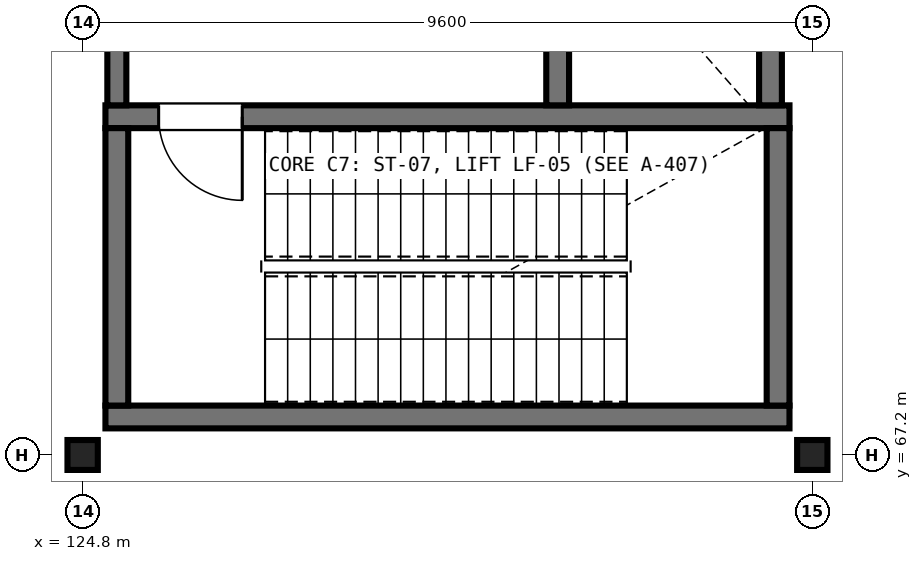
"""IFC4 building model, lengths in metres.
Left out: names, types, materials, properties, quantities, classifications, styles, units other than length and angle.
Written with IfcOpenShell. Run it as: python <this file> out.ifc"""

import sys

from ifc_helpers import new_model, si_unit, direction, frame, frame_2d, origin, origin_2d, place, context, subcontext, project, spatial, rectangle, i_section, extrude, element, fill, save


model = new_model("IFC4")
c1 = context("Model", 3, precision=1e-05, world=origin(), true_north=direction((0.0, 1.0)))
c2 = subcontext(c1, "Body", "Model", "MODEL_VIEW")
j1 = project(units=[si_unit("LENGTHUNIT", "METRE"), si_unit("PLANEANGLEUNIT", "RADIAN")], contexts=[c1])
p1 = place(None, origin())
s1 = spatial("IfcSite", under=j1, at=p1, CompositionType="ELEMENT")
p2 = place(p1, origin())
s2 = spatial("IfcBuilding", under=s1, at=p2, CompositionType="ELEMENT")
p3 = place(p2, origin())
s3 = spatial("IfcBuildingStorey", under=s2, at=p3, CompositionType="ELEMENT", Elevation=0.0)
for number, where, z_axis, x_axis in (
    (1, (124.8, 67.2, 0.0), (0.0, 0.0, 1.0), (1.0, 0.0, 0.0)),
    (2, (134.4, 67.2, 0.0), (0.0, 0.0, 1.0), (1.0, 0.0, 0.0)),
):
    element("IfcColumn", number, at=place(p3, frame(where, z_axis=z_axis, x_axis=x_axis)), inside=s3, PredefinedType="COLUMN", context=c2, shape_type="SweptSolid", body=[
        extrude(i_section(OverallWidth=0.399, OverallDepth=0.394, WebThickness=0.023, FlangeThickness=0.037, FilletRadius=0.015, at=origin_2d()), origin(), (0.0, 0.0, 1.0), 5.75),
    ])
p4 = place(p3, frame((125.1, 67.7, 0.0), z_axis=(0.0, 0.0, 1.0), x_axis=(1.0, 0.0, 0.0)))
e3 = element("IfcWall", 3, at=p4, inside=s3, PredefinedType="SHEAR", context=c2, shape_type="SweptSolid", body=[
    extrude(rectangle(XDim=9.0, YDim=0.3, at=frame_2d((4.5, 0.0))), origin(), (0.0, 0.0, 1.0), 5.75),
])
p5 = place(p3, frame((134.1, 71.65, 0.0), z_axis=(0.0, 0.0, 1.0), x_axis=(-1.0, 0.0, 0.0)))
e4 = element("IfcWall", 4, at=p5, inside=s3, PredefinedType="SHEAR", context=c2, shape_type="SweptSolid", body=[
    extrude(rectangle(XDim=9.0, YDim=0.3, at=frame_2d((4.5, 0.0))), origin(), (0.0, 0.0, 1.0), 5.75),
])
p6 = place(p5, frame((7.2, 0.0, 0.0)))
e5 = element("IfcOpeningElement", 5, at=p6, cuts=e4, PredefinedType="OPENING", context=c2, shape_type="SweptSolid", body=[
    extrude(rectangle(XDim=1.1, YDim=2.15, at=frame_2d((0.55, 1.075))), frame((0.0, 0.16, 0.0), z_axis=(0.0, -1.0, 0.0), x_axis=(1.0, 0.0, 0.0)), (0.0, 0.0, 1.0), 0.32),
])
for number, where, z_axis, x_axis in (
    (6, (125.25, 67.85, 0.0), (0.0, 0.0, 1.0), (0.0, 1.0, 0.0)),
    (7, (133.95, 71.5, 0.0), (0.0, 0.0, 1.0), (0.0, -1.0, 0.0)),
):
    element("IfcWall", number, at=place(p3, frame(where, z_axis=z_axis, x_axis=x_axis)), inside=s3, PredefinedType="SHEAR", context=c2, shape_type="SweptSolid", body=[
        extrude(rectangle(XDim=3.65, YDim=0.3, at=frame_2d((1.825, 0.0))), origin(), (0.0, 0.0, 1.0), 5.75),
    ])
p7 = place(p3, frame((131.05, 74.5, 0.0), z_axis=(0.0, 0.0, 1.0), x_axis=(0.0, -1.0, 0.0)))
e8 = element("IfcWall", 8, at=p7, inside=s3, PredefinedType="SHEAR", context=c2, shape_type="SweptSolid", body=[
    extrude(rectangle(XDim=2.7, YDim=0.3, at=frame_2d((1.35, 0.0))), origin(), (0.0, 0.0, 1.0), 5.75),
])
p8 = place(p7, frame((0.74, 0.0, 0.0)))
e9 = element("IfcOpeningElement", 9, at=p8, cuts=e8, PredefinedType="OPENING", context=c2, shape_type="SweptSolid", body=[
    extrude(rectangle(XDim=1.22, YDim=2.15, at=frame_2d((0.61, 1.075))), frame((0.0, 0.16, 0.0), z_axis=(0.0, -1.0, 0.0), x_axis=(1.0, 0.0, 0.0)), (0.0, 0.0, 1.0), 0.32),
])
p9 = place(p3, frame((133.85, 71.8, 0.0), z_axis=(0.0, 0.0, 1.0), x_axis=(0.0, 1.0, 0.0)))
e10 = element("IfcWall", 10, at=p9, inside=s3, PredefinedType="SHEAR", context=c2, shape_type="SweptSolid", body=[
    extrude(rectangle(XDim=2.7, YDim=0.3, at=frame_2d((1.35, 0.0))), origin(), (0.0, 0.0, 1.0), 5.75),
])
p10 = place(p3, frame((125.25, 71.8, 0.0), z_axis=(0.0, 0.0, 1.0), x_axis=(0.0, 1.0, 0.0)))
e11 = element("IfcWall", 11, at=p10, inside=s3, PredefinedType="SHEAR", context=c2, shape_type="SweptSolid", body=[
    extrude(rectangle(XDim=2.7, YDim=0.25, at=frame_2d((1.35, 0.0))), origin(), (0.0, 0.0, 1.0), 5.75),
])
p11 = place(p10, frame((0.75, 0.0, 0.0)))
e12 = element("IfcOpeningElement", 12, at=p11, cuts=e11, PredefinedType="OPENING", context=c2, shape_type="SweptSolid", body=[
    extrude(rectangle(XDim=1.2, YDim=2.15, at=frame_2d((0.6, 1.075))), frame((0.0, 0.135, 0.0), z_axis=(0.0, -1.0, 0.0), x_axis=(1.0, 0.0, 0.0)), (0.0, 0.0, 1.0), 0.27),
])
p12 = place(p6, origin())
e13 = element("IfcDoor", 13, at=p12, inside=s3, OperationType="SINGLE_SWING_LEFT", PredefinedType="DOOR", context=c2, shape_type="SweptSolid", body=[
    extrude(rectangle(XDim=1.1, YDim=2.15, at=frame_2d((0.55, 1.075))), frame((0.0, 0.025, 0.0), z_axis=(0.0, -1.0, 0.0), x_axis=(1.0, 0.0, 0.0)), (0.0, 0.0, 1.0), 0.05),
])
fill(e5, e13)
save(model, sys.argv[1])
